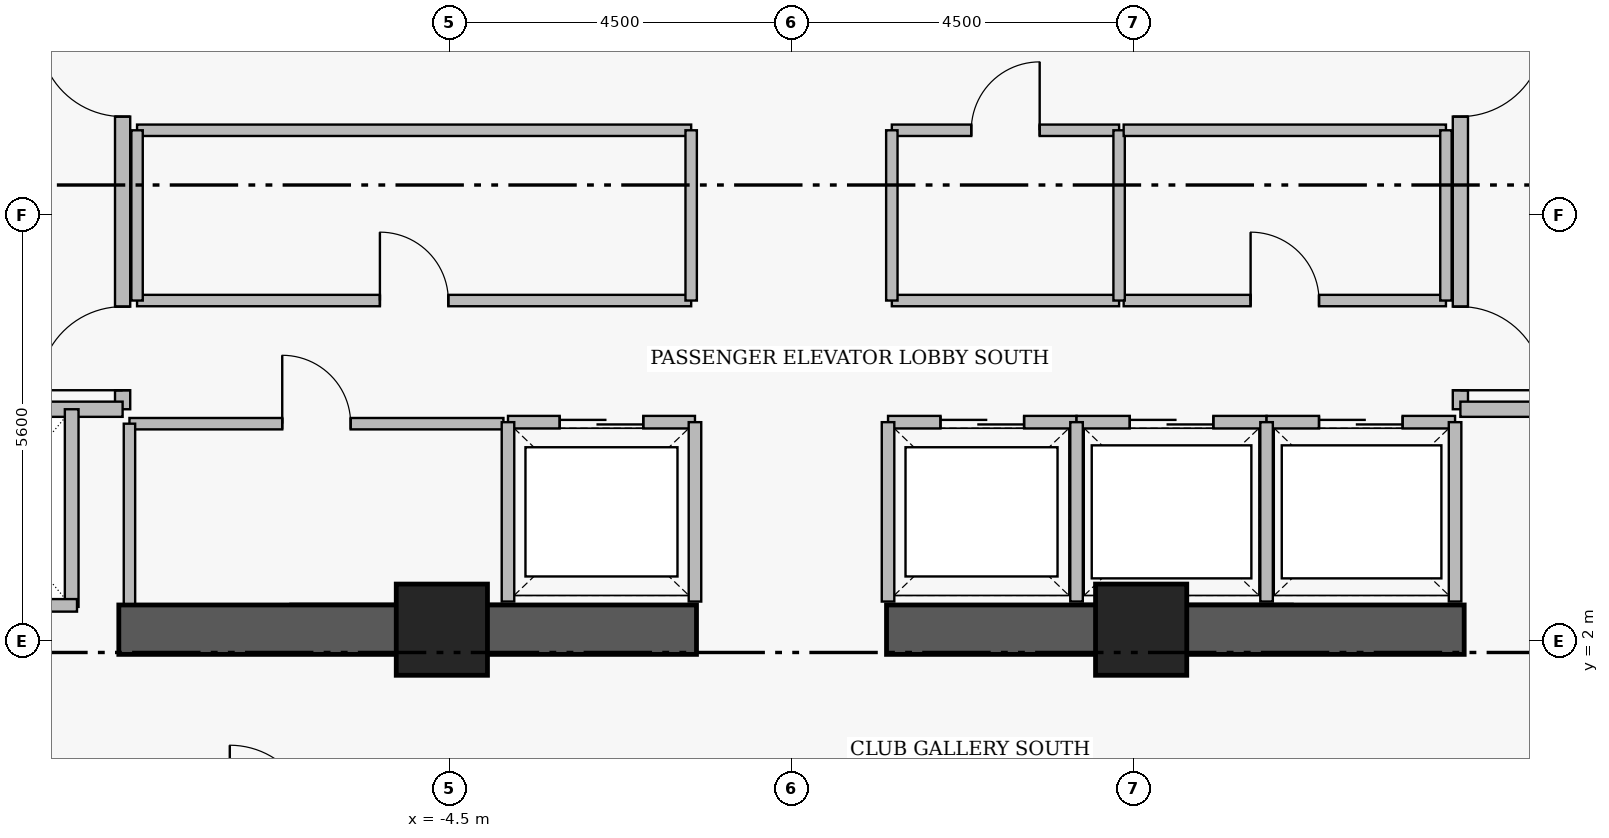
"""IFC4 building model, lengths in metres.
Left out: names, types, materials, properties, quantities, classifications, styles, units other than length and angle.
Written with IfcOpenShell. Run it as: python <this file> out.ifc"""

import sys

from ifc_helpers import new_model, si_unit, direction, frame, frame_2d, origin, origin_2d, place, context, subcontext, project, spatial, rectangle, extrude, element, fill, save


model = new_model("IFC4")
c1 = context("Model", 3, precision=1e-05, world=origin(), true_north=direction((0.0, 1.0)))
c2 = subcontext(c1, "Body", "Model", "MODEL_VIEW")
j1 = project(units=[si_unit("LENGTHUNIT", "METRE"), si_unit("PLANEANGLEUNIT", "RADIAN")], contexts=[c1])
p1 = place(None, origin())
s1 = spatial("IfcSite", under=j1, at=p1, CompositionType="ELEMENT")
p2 = place(p1, origin())
s2 = spatial("IfcBuilding", under=s1, at=p2, CompositionType="ELEMENT")
p3 = place(p2, frame((0.0, 0.0, 168.2)))
s3 = spatial("IfcBuildingStorey", under=s2, at=p3, CompositionType="ELEMENT", Elevation=168.2)
for number, where, z_axis, x_axis in (
    (1, (-8.85, 2.15, 0.0), (0.0, 0.0, 1.0), (1.0, 0.0, 0.0)),
    (2, (1.25, 2.15, 0.0), (0.0, 0.0, 1.0), (1.0, 0.0, 0.0)),
):
    element("IfcWall", number, at=place(p3, frame(where, z_axis=z_axis, x_axis=x_axis)), inside=s3, PredefinedType="SHEAR", context=c2, shape_type="SweptSolid", body=[
        extrude(rectangle(XDim=7.6, YDim=0.65, at=frame_2d((3.8, 0.0))), origin(), (0.0, 0.0, 1.0), 4.38),
    ])
for number, where, z_axis, x_axis in (
    (3, (-4.6, 2.15, 0.0), (0.0, 0.0, 1.0), (1.0, 0.0, 0.0)),
    (4, (4.6, 2.15, 0.0), (0.0, 0.0, 1.0), (1.0, 0.0, 0.0)),
):
    element("IfcColumn", number, at=place(p3, frame(where, z_axis=z_axis, x_axis=x_axis)), inside=s3, PredefinedType="COLUMN", context=c2, shape_type="SweptSolid", body=[
        extrude(rectangle(XDim=1.2, YDim=1.2, at=origin_2d()), origin(), (0.0, 0.0, 1.0), 4.6),
    ])
p4 = place(p3, frame((-8.8, 5.05, 0.0), z_axis=(0.0, 0.0, 1.0), x_axis=(0.0, 1.0, 0.0)))
e5 = element("IfcWall", 5, at=p4, inside=s3, PredefinedType="PARTITIONING", context=c2, shape_type="SweptSolid", body=[
    extrude(rectangle(XDim=6.1, YDim=0.2, at=frame_2d((3.05, 0.0))), origin(), (0.0, 0.0, 1.0), 4.38),
])
p5 = place(p4, frame((0.25, 0.0, 0.0)))
e6 = element("IfcOpeningElement", 6, at=p5, cuts=e5, PredefinedType="OPENING", context=c2, shape_type="SweptSolid", body=[
    extrude(rectangle(XDim=1.1, YDim=2.2, at=frame_2d((0.55, 1.1))), frame((0.0, 0.11, 0.0), z_axis=(0.0, -1.0, 0.0), x_axis=(1.0, 0.0, 0.0)), (0.0, 0.0, 1.0), 0.22),
])
p6 = place(p4, frame((3.85, 0.0, 0.0)))
e7 = element("IfcOpeningElement", 7, at=p6, cuts=e5, PredefinedType="OPENING", context=c2, shape_type="SweptSolid", body=[
    extrude(rectangle(XDim=1.1, YDim=2.2, at=frame_2d((0.55, 1.1))), frame((0.0, 0.11, 0.0), z_axis=(0.0, -1.0, 0.0), x_axis=(1.0, 0.0, 0.0)), (0.0, 0.0, 1.0), 0.22),
])
p7 = place(p3, frame((8.8, 11.15, 0.0), z_axis=(0.0, 0.0, 1.0), x_axis=(0.0, -1.0, 0.0)))
e8 = element("IfcWall", 8, at=p7, inside=s3, PredefinedType="PARTITIONING", context=c2, shape_type="SweptSolid", body=[
    extrude(rectangle(XDim=6.1, YDim=0.2, at=frame_2d((3.05, 0.0))), origin(), (0.0, 0.0, 1.0), 4.38),
])
p8 = place(p7, frame((1.15, 0.0, 0.0)))
e9 = element("IfcOpeningElement", 9, at=p8, cuts=e8, PredefinedType="OPENING", context=c2, shape_type="SweptSolid", body=[
    extrude(rectangle(XDim=1.1, YDim=2.2, at=frame_2d((0.55, 1.1))), frame((0.0, 0.11, 0.0), z_axis=(0.0, -1.0, 0.0), x_axis=(1.0, 0.0, 0.0)), (0.0, 0.0, 1.0), 0.22),
])
p9 = place(p7, frame((4.75, 0.0, 0.0)))
e10 = element("IfcOpeningElement", 10, at=p9, cuts=e8, PredefinedType="OPENING", context=c2, shape_type="SweptSolid", body=[
    extrude(rectangle(XDim=1.1, YDim=2.2, at=frame_2d((0.55, 1.1))), frame((0.0, 0.11, 0.0), z_axis=(0.0, -1.0, 0.0), x_axis=(1.0, 0.0, 0.0)), (0.0, 0.0, 1.0), 0.22),
])
p10 = place(p3, frame((-3.73, 4.88, 0.0), z_axis=(0.0, 0.0, 1.0), x_axis=(1.0, 0.0, 0.0)))
e11 = element("IfcWall", 11, at=p10, inside=s3, PredefinedType="PARTITIONING", context=c2, shape_type="SweptSolid", body=[
    extrude(rectangle(XDim=2.46, YDim=0.165, at=frame_2d((1.23, 0.0))), origin(), (0.0, 0.0, 1.0), 4.38),
])
p11 = place(p10, frame((0.68, 0.0, 0.0)))
e12 = element("IfcOpeningElement", 12, at=p11, cuts=e11, PredefinedType="OPENING", context=c2, shape_type="SweptSolid", body=[
    extrude(rectangle(XDim=1.1, YDim=2.25, at=frame_2d((0.55, 1.125))), frame((0.0, 0.093, 0.0), z_axis=(0.0, -1.0, 0.0), x_axis=(1.0, 0.0, 0.0)), (0.0, 0.0, 1.0), 0.185),
])
p12 = place(p3, frame((1.27, 4.88, 0.0), z_axis=(0.0, 0.0, 1.0), x_axis=(1.0, 0.0, 0.0)))
e13 = element("IfcWall", 13, at=p12, inside=s3, PredefinedType="PARTITIONING", context=c2, shape_type="SweptSolid", body=[
    extrude(rectangle(XDim=2.48, YDim=0.165, at=frame_2d((1.24, 0.0))), origin(), (0.0, 0.0, 1.0), 4.38),
])
p13 = place(p12, frame((0.69, 0.0, 0.0)))
e14 = element("IfcOpeningElement", 14, at=p13, cuts=e13, PredefinedType="OPENING", context=c2, shape_type="SweptSolid", body=[
    extrude(rectangle(XDim=1.1, YDim=2.25, at=frame_2d((0.55, 1.125))), frame((0.0, 0.093, 0.0), z_axis=(0.0, -1.0, 0.0), x_axis=(1.0, 0.0, 0.0)), (0.0, 0.0, 1.0), 0.185),
])
p14 = place(p3, frame((3.75, 4.88, 0.0), z_axis=(0.0, 0.0, 1.0), x_axis=(1.0, 0.0, 0.0)))
e15 = element("IfcWall", 15, at=p14, inside=s3, PredefinedType="PARTITIONING", context=c2, shape_type="SweptSolid", body=[
    extrude(rectangle(XDim=2.5, YDim=0.165, at=frame_2d((1.25, 0.0))), origin(), (0.0, 0.0, 1.0), 4.38),
])
p15 = place(p14, frame((0.7, 0.0, 0.0)))
e16 = element("IfcOpeningElement", 16, at=p15, cuts=e15, PredefinedType="OPENING", context=c2, shape_type="SweptSolid", body=[
    extrude(rectangle(XDim=1.1, YDim=2.25, at=frame_2d((0.55, 1.125))), frame((0.0, 0.093, 0.0), z_axis=(0.0, -1.0, 0.0), x_axis=(1.0, 0.0, 0.0)), (0.0, 0.0, 1.0), 0.185),
])
p16 = place(p3, frame((6.25, 4.88, 0.0), z_axis=(0.0, 0.0, 1.0), x_axis=(1.0, 0.0, 0.0)))
e17 = element("IfcWall", 17, at=p16, inside=s3, PredefinedType="PARTITIONING", context=c2, shape_type="SweptSolid", body=[
    extrude(rectangle(XDim=2.48, YDim=0.165, at=frame_2d((1.24, 0.0))), origin(), (0.0, 0.0, 1.0), 4.38),
])
p17 = place(p16, frame((0.69, 0.0, 0.0)))
e18 = element("IfcOpeningElement", 18, at=p17, cuts=e17, PredefinedType="OPENING", context=c2, shape_type="SweptSolid", body=[
    extrude(rectangle(XDim=1.1, YDim=2.25, at=frame_2d((0.55, 1.125))), frame((0.0, 0.093, 0.0), z_axis=(0.0, -1.0, 0.0), x_axis=(1.0, 0.0, 0.0)), (0.0, 0.0, 1.0), 0.185),
])
p18 = place(p3, frame((-8.71, 4.86, 0.0), z_axis=(0.0, 0.0, 1.0), x_axis=(1.0, 0.0, 0.0)))
e19 = element("IfcWall", 19, at=p18, inside=s3, PredefinedType="PARTITIONING", context=c2, shape_type="SweptSolid", body=[
    extrude(rectangle(XDim=4.92, YDim=0.15, at=frame_2d((2.46, 0.0))), origin(), (0.0, 0.0, 1.0), 4.38),
])
p19 = place(p18, frame((2.01, 0.0, 0.0)))
e20 = element("IfcOpeningElement", 20, at=p19, cuts=e19, PredefinedType="OPENING", context=c2, shape_type="SweptSolid", body=[
    extrude(rectangle(XDim=0.9, YDim=2.15, at=frame_2d((0.45, 1.075))), frame((0.0, 0.085, 0.0), z_axis=(0.0, -1.0, 0.0), x_axis=(1.0, 0.0, 0.0)), (0.0, 0.0, 1.0), 0.17),
])
p20 = place(p3, frame((-8.61, 6.48, 0.0), z_axis=(0.0, 0.0, 1.0), x_axis=(1.0, 0.0, 0.0)))
e21 = element("IfcWall", 21, at=p20, inside=s3, PredefinedType="PARTITIONING", context=c2, shape_type="SweptSolid", body=[
    extrude(rectangle(XDim=7.29, YDim=0.15, at=frame_2d((3.645, 0.0))), origin(), (0.0, 0.0, 1.0), 4.38),
])
p21 = place(p20, frame((3.195, 0.0, 0.0)))
e22 = element("IfcOpeningElement", 22, at=p21, cuts=e21, PredefinedType="OPENING", context=c2, shape_type="SweptSolid", body=[
    extrude(rectangle(XDim=0.9, YDim=2.15, at=frame_2d((0.45, 1.075))), frame((0.0, 0.085, 0.0), z_axis=(0.0, -1.0, 0.0), x_axis=(1.0, 0.0, 0.0)), (0.0, 0.0, 1.0), 0.17),
])
p22 = place(p3, frame((1.32, 8.72, 0.0), z_axis=(0.0, 0.0, 1.0), x_axis=(1.0, 0.0, 0.0)))
e23 = element("IfcWall", 23, at=p22, inside=s3, PredefinedType="PARTITIONING", context=c2, shape_type="SweptSolid", body=[
    extrude(rectangle(XDim=2.99, YDim=0.15, at=frame_2d((1.495, 0.0))), origin(), (0.0, 0.0, 1.0), 4.38),
])
p23 = place(p22, frame((1.045, 0.0, 0.0)))
e24 = element("IfcOpeningElement", 24, at=p23, cuts=e23, PredefinedType="OPENING", context=c2, shape_type="SweptSolid", body=[
    extrude(rectangle(XDim=0.9, YDim=2.15, at=frame_2d((0.45, 1.075))), frame((0.0, 0.085, 0.0), z_axis=(0.0, -1.0, 0.0), x_axis=(1.0, 0.0, 0.0)), (0.0, 0.0, 1.0), 0.17),
])
p24 = place(p3, frame((4.37, 6.48, 0.0), z_axis=(0.0, 0.0, 1.0), x_axis=(1.0, 0.0, 0.0)))
e25 = element("IfcWall", 25, at=p24, inside=s3, PredefinedType="PARTITIONING", context=c2, shape_type="SweptSolid", body=[
    extrude(rectangle(XDim=4.24, YDim=0.15, at=frame_2d((2.12, 0.0))), origin(), (0.0, 0.0, 1.0), 4.38),
])
p25 = place(p24, frame((1.67, 0.0, 0.0)))
e26 = element("IfcOpeningElement", 26, at=p25, cuts=e25, PredefinedType="OPENING", context=c2, shape_type="SweptSolid", body=[
    extrude(rectangle(XDim=0.9, YDim=2.15, at=frame_2d((0.45, 1.075))), frame((0.0, 0.085, 0.0), z_axis=(0.0, -1.0, 0.0), x_axis=(1.0, 0.0, 0.0)), (0.0, 0.0, 1.0), 0.17),
])
for number, where, z_axis, x_axis in (
    (27, (-11.65, 5.05, 0.0), (0.0, 0.0, 1.0), (1.0, 0.0, 0.0)),
    (28, (8.8, 5.05, 0.0), (0.0, 0.0, 1.0), (1.0, 0.0, 0.0)),
):
    element("IfcWall", number, at=place(p3, frame(where, z_axis=z_axis, x_axis=x_axis)), inside=s3, PredefinedType="PARTITIONING", context=c2, shape_type="SweptSolid", body=[
        extrude(rectangle(XDim=2.85, YDim=0.2, at=frame_2d((1.425, 0.0))), origin(), (0.0, 0.0, 1.0), 4.38),
    ])
for number, where, z_axis, x_axis in (
    (29, (-3.73, 2.52, 0.0), (0.0, 0.0, 1.0), (0.0, 1.0, 0.0)),
    (30, (-1.27, 2.52, 0.0), (0.0, 0.0, 1.0), (0.0, 1.0, 0.0)),
    (31, (1.27, 2.52, 0.0), (0.0, 0.0, 1.0), (0.0, 1.0, 0.0)),
    (32, (3.75, 2.52, 0.0), (0.0, 0.0, 1.0), (0.0, 1.0, 0.0)),
    (33, (6.25, 2.52, 0.0), (0.0, 0.0, 1.0), (0.0, 1.0, 0.0)),
    (34, (8.73, 2.52, 0.0), (0.0, 0.0, 1.0), (0.0, 1.0, 0.0)),
):
    element("IfcWall", number, at=place(p3, frame(where, z_axis=z_axis, x_axis=x_axis)), inside=s3, PredefinedType="PARTITIONING", context=c2, shape_type="SweptSolid", body=[
        extrude(rectangle(XDim=2.36, YDim=0.165, at=frame_2d((1.18, 0.0))), origin(), (0.0, 0.0, 1.0), 4.38),
    ])
p26 = place(p3, frame((-8.71, 2.49, 0.0), z_axis=(0.0, 0.0, 1.0), x_axis=(0.0, 1.0, 0.0)))
e35 = element("IfcWall", 35, at=p26, inside=s3, PredefinedType="PARTITIONING", context=c2, shape_type="SweptSolid", body=[
    extrude(rectangle(XDim=2.37, YDim=0.15, at=frame_2d((1.185, 0.0))), origin(), (0.0, 0.0, 1.0), 4.38),
])
p27 = place(p3, frame((-9.47, 2.45, 0.0), z_axis=(0.0, 0.0, 1.0), x_axis=(0.0, 1.0, 0.0)))
e36 = element("IfcWall", 36, at=p27, inside=s3, PredefinedType="PARTITIONING", context=c2, shape_type="SweptSolid", body=[
    extrude(rectangle(XDim=2.6, YDim=0.18, at=frame_2d((1.3, 0.0))), origin(), (0.0, 0.0, 1.0), 4.38),
])
p28 = place(p3, frame((-11.71, 2.47, 0.0), z_axis=(0.0, 0.0, 1.0), x_axis=(1.0, 0.0, 0.0)))
e37 = element("IfcWall", 37, at=p28, inside=s3, PredefinedType="PARTITIONING", context=c2, shape_type="SweptSolid", body=[
    extrude(rectangle(XDim=2.31, YDim=0.165, at=frame_2d((1.155, 0.0))), origin(), (0.0, 0.0, 1.0), 3.28),
])
p29 = place(p3, frame((-8.61, 8.72, 0.0), z_axis=(0.0, 0.0, 1.0), x_axis=(1.0, 0.0, 0.0)))
e38 = element("IfcWall", 38, at=p29, inside=s3, PredefinedType="PARTITIONING", context=c2, shape_type="SweptSolid", body=[
    extrude(rectangle(XDim=7.29, YDim=0.15, at=frame_2d((3.645, 0.0))), origin(), (0.0, 0.0, 1.0), 4.38),
])
for number, where, z_axis, x_axis in (
    (39, (-8.61, 6.48, 0.0), (0.0, 0.0, 1.0), (0.0, 1.0, 0.0)),
    (40, (-1.32, 6.48, 0.0), (0.0, 0.0, 1.0), (0.0, 1.0, 0.0)),
):
    element("IfcWall", number, at=place(p3, frame(where, z_axis=z_axis, x_axis=x_axis)), inside=s3, PredefinedType="PARTITIONING", context=c2, shape_type="SweptSolid", body=[
        extrude(rectangle(XDim=2.24, YDim=0.15, at=frame_2d((1.12, 0.0))), origin(), (0.0, 0.0, 1.0), 4.38),
    ])
p30 = place(p3, frame((1.32, 6.48, 0.0), z_axis=(0.0, 0.0, 1.0), x_axis=(1.0, 0.0, 0.0)))
e41 = element("IfcWall", 41, at=p30, inside=s3, PredefinedType="PARTITIONING", context=c2, shape_type="SweptSolid", body=[
    extrude(rectangle(XDim=2.99, YDim=0.15, at=frame_2d((1.495, 0.0))), origin(), (0.0, 0.0, 1.0), 4.38),
])
for number, where, z_axis, x_axis in (
    (42, (1.32, 6.48, 0.0), (0.0, 0.0, 1.0), (0.0, 1.0, 0.0)),
    (43, (4.31, 6.48, 0.0), (0.0, 0.0, 1.0), (0.0, 1.0, 0.0)),
):
    element("IfcWall", number, at=place(p3, frame(where, z_axis=z_axis, x_axis=x_axis)), inside=s3, PredefinedType="PARTITIONING", context=c2, shape_type="SweptSolid", body=[
        extrude(rectangle(XDim=2.24, YDim=0.15, at=frame_2d((1.12, 0.0))), origin(), (0.0, 0.0, 1.0), 4.38),
    ])
p31 = place(p3, frame((4.37, 8.72, 0.0), z_axis=(0.0, 0.0, 1.0), x_axis=(1.0, 0.0, 0.0)))
e44 = element("IfcWall", 44, at=p31, inside=s3, PredefinedType="PARTITIONING", context=c2, shape_type="SweptSolid", body=[
    extrude(rectangle(XDim=4.24, YDim=0.15, at=frame_2d((2.12, 0.0))), origin(), (0.0, 0.0, 1.0), 4.38),
])
p32 = place(p3, frame((8.61, 6.48, 0.0), z_axis=(0.0, 0.0, 1.0), x_axis=(0.0, 1.0, 0.0)))
e45 = element("IfcWall", 45, at=p32, inside=s3, PredefinedType="PARTITIONING", context=c2, shape_type="SweptSolid", body=[
    extrude(rectangle(XDim=2.24, YDim=0.15, at=frame_2d((1.12, 0.0))), origin(), (0.0, 0.0, 1.0), 4.38),
])
p33 = place(p5, origin())
e46 = element("IfcDoor", 46, at=p33, inside=s3, OperationType="SINGLE_SWING_LEFT", PredefinedType="DOOR", context=c2, shape_type="SweptSolid", body=[
    extrude(rectangle(XDim=1.1, YDim=2.2, at=frame_2d((0.55, 1.1))), frame((0.0, 0.025, 0.0), z_axis=(0.0, -1.0, 0.0), x_axis=(1.0, 0.0, 0.0)), (0.0, 0.0, 1.0), 0.05),
])
fill(e6, e46)
p34 = place(p6, origin())
e47 = element("IfcDoor", 47, at=p34, inside=s3, OperationType="SINGLE_SWING_RIGHT", PredefinedType="DOOR", context=c2, shape_type="SweptSolid", body=[
    extrude(rectangle(XDim=1.1, YDim=2.2, at=frame_2d((0.55, 1.1))), frame((0.0, 0.025, 0.0), z_axis=(0.0, -1.0, 0.0), x_axis=(1.0, 0.0, 0.0)), (0.0, 0.0, 1.0), 0.05),
])
fill(e7, e47)
p35 = place(p8, origin())
e48 = element("IfcDoor", 48, at=p35, inside=s3, OperationType="SINGLE_SWING_LEFT", PredefinedType="DOOR", context=c2, shape_type="SweptSolid", body=[
    extrude(rectangle(XDim=1.1, YDim=2.2, at=frame_2d((0.55, 1.1))), frame((0.0, 0.025, 0.0), z_axis=(0.0, -1.0, 0.0), x_axis=(1.0, 0.0, 0.0)), (0.0, 0.0, 1.0), 0.05),
])
fill(e9, e48)
p36 = place(p9, origin())
e49 = element("IfcDoor", 49, at=p36, inside=s3, OperationType="SINGLE_SWING_RIGHT", PredefinedType="DOOR", context=c2, shape_type="SweptSolid", body=[
    extrude(rectangle(XDim=1.1, YDim=2.2, at=frame_2d((0.55, 1.1))), frame((0.0, 0.025, 0.0), z_axis=(0.0, -1.0, 0.0), x_axis=(1.0, 0.0, 0.0)), (0.0, 0.0, 1.0), 0.05),
])
fill(e10, e49)
p37 = place(p11, origin())
e50 = element("IfcDoor", 50, at=p37, inside=s3, OperationType="SLIDING_TO_LEFT", PredefinedType="DOOR", context=c2, shape_type="SweptSolid", body=[
    extrude(rectangle(XDim=1.1, YDim=2.25, at=frame_2d((0.55, 1.125))), frame((0.0, 0.025, 0.0), z_axis=(0.0, -1.0, 0.0), x_axis=(1.0, 0.0, 0.0)), (0.0, 0.0, 1.0), 0.05),
])
fill(e12, e50)
p38 = place(p13, origin())
e51 = element("IfcDoor", 51, at=p38, inside=s3, OperationType="SLIDING_TO_LEFT", PredefinedType="DOOR", context=c2, shape_type="SweptSolid", body=[
    extrude(rectangle(XDim=1.1, YDim=2.25, at=frame_2d((0.55, 1.125))), frame((0.0, 0.025, 0.0), z_axis=(0.0, -1.0, 0.0), x_axis=(1.0, 0.0, 0.0)), (0.0, 0.0, 1.0), 0.05),
])
fill(e14, e51)
p39 = place(p15, origin())
e52 = element("IfcDoor", 52, at=p39, inside=s3, OperationType="SLIDING_TO_LEFT", PredefinedType="DOOR", context=c2, shape_type="SweptSolid", body=[
    extrude(rectangle(XDim=1.1, YDim=2.25, at=frame_2d((0.55, 1.125))), frame((0.0, 0.025, 0.0), z_axis=(0.0, -1.0, 0.0), x_axis=(1.0, 0.0, 0.0)), (0.0, 0.0, 1.0), 0.05),
])
fill(e16, e52)
p40 = place(p17, origin())
e53 = element("IfcDoor", 53, at=p40, inside=s3, OperationType="SLIDING_TO_LEFT", PredefinedType="DOOR", context=c2, shape_type="SweptSolid", body=[
    extrude(rectangle(XDim=1.1, YDim=2.25, at=frame_2d((0.55, 1.125))), frame((0.0, 0.025, 0.0), z_axis=(0.0, -1.0, 0.0), x_axis=(1.0, 0.0, 0.0)), (0.0, 0.0, 1.0), 0.05),
])
fill(e18, e53)
p41 = place(p19, origin())
e54 = element("IfcDoor", 54, at=p41, inside=s3, OperationType="SINGLE_SWING_LEFT", PredefinedType="DOOR", context=c2, shape_type="SweptSolid", body=[
    extrude(rectangle(XDim=0.9, YDim=2.15, at=frame_2d((0.45, 1.075))), frame((0.0, 0.025, 0.0), z_axis=(0.0, -1.0, 0.0), x_axis=(1.0, 0.0, 0.0)), (0.0, 0.0, 1.0), 0.05),
])
fill(e20, e54)
p42 = place(p21, origin())
e55 = element("IfcDoor", 55, at=p42, inside=s3, OperationType="SINGLE_SWING_LEFT", PredefinedType="DOOR", context=c2, shape_type="SweptSolid", body=[
    extrude(rectangle(XDim=0.9, YDim=2.15, at=frame_2d((0.45, 1.075))), frame((0.0, 0.025, 0.0), z_axis=(0.0, -1.0, 0.0), x_axis=(1.0, 0.0, 0.0)), (0.0, 0.0, 1.0), 0.05),
])
fill(e22, e55)
p43 = place(p23, origin())
e56 = element("IfcDoor", 56, at=p43, inside=s3, OperationType="SINGLE_SWING_RIGHT", PredefinedType="DOOR", context=c2, shape_type="SweptSolid", body=[
    extrude(rectangle(XDim=0.9, YDim=2.15, at=frame_2d((0.45, 1.075))), frame((0.0, 0.025, 0.0), z_axis=(0.0, -1.0, 0.0), x_axis=(1.0, 0.0, 0.0)), (0.0, 0.0, 1.0), 0.05),
])
fill(e24, e56)
p44 = place(p25, origin())
e57 = element("IfcDoor", 57, at=p44, inside=s3, OperationType="SINGLE_SWING_LEFT", PredefinedType="DOOR", context=c2, shape_type="SweptSolid", body=[
    extrude(rectangle(XDim=0.9, YDim=2.15, at=frame_2d((0.45, 1.075))), frame((0.0, 0.025, 0.0), z_axis=(0.0, -1.0, 0.0), x_axis=(1.0, 0.0, 0.0)), (0.0, 0.0, 1.0), 0.05),
])
fill(e26, e57)
save(model, sys.argv[1])
